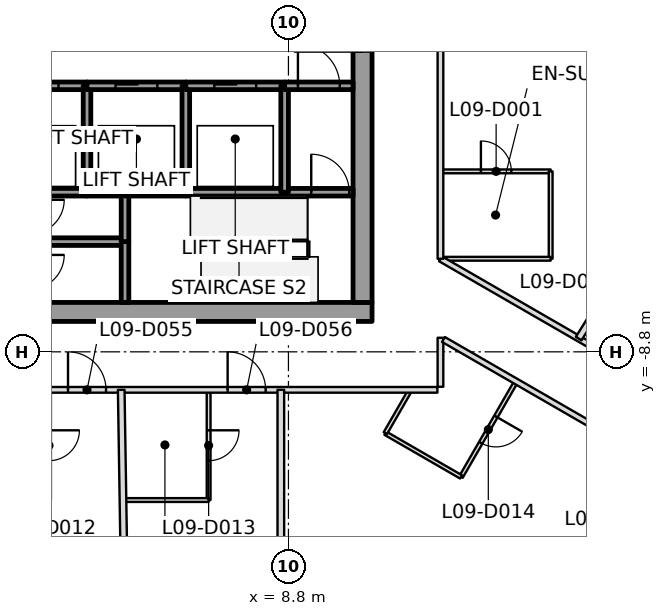
"""IFC4 building model, lengths in metres.
Left out: names, types, materials, properties, quantities, classifications, styles, units other than length and angle.
Written with IfcOpenShell. Run it as: python <this file> out.ifc"""

import sys

from ifc_helpers import new_model, si_unit, direction, frame, frame_2d, origin, place, context, subcontext, project, spatial, rectangle, extrude, element, fill, save


model = new_model("IFC4")
c1 = context("Model", 3, precision=1e-05, world=origin(), true_north=direction((0.0, 1.0)))
c2 = subcontext(c1, "Body", "Model", "MODEL_VIEW")
j1 = project(units=[si_unit("LENGTHUNIT", "METRE"), si_unit("PLANEANGLEUNIT", "RADIAN")], contexts=[c1])
p1 = place(None, origin())
s1 = spatial("IfcSite", under=j1, at=p1, CompositionType="ELEMENT")
p2 = place(p1, origin())
s2 = spatial("IfcBuilding", under=s1, at=p2, CompositionType="ELEMENT")
p3 = place(p2, frame((0.0, 0.0, 55.4)))
s3 = spatial("IfcBuildingStorey", under=s2, at=p3, CompositionType="ELEMENT", Elevation=55.4)
p4 = place(p3, frame((-11.0, -7.75, 0.0), z_axis=(0.0, 0.0, 1.0), x_axis=(1.0, 0.0, 0.0)))
e1 = element("IfcWall", 1, at=p4, inside=s3, PredefinedType="SHEAR", context=c2, shape_type="SweptSolid", body=[
    extrude(rectangle(XDim=22.0, YDim=0.5, at=frame_2d((11.0, 0.0))), origin(), (0.0, 0.0, 1.0), 3.7),
])
p5 = place(p4, frame((10.45, 0.0, 0.0)))
e2 = element("IfcOpeningElement", 2, at=p5, cuts=e1, PredefinedType="OPENING", context=c2, shape_type="SweptSolid", body=[
    extrude(rectangle(XDim=1.1, YDim=2.1, at=frame_2d((0.55, 1.05))), frame((0.0, 0.25, 0.0), z_axis=(0.0, -1.0, 0.0), x_axis=(1.0, 0.0, 0.0)), (0.0, 0.0, 1.0), 0.5),
])
p6 = place(p3, frame((10.75, -7.5, 0.0), z_axis=(0.0, 0.0, 1.0), x_axis=(0.0, 1.0, 0.0)))
e3 = element("IfcWall", 3, at=p6, inside=s3, PredefinedType="SHEAR", context=c2, shape_type="SweptSolid", body=[
    extrude(rectangle(XDim=15.0, YDim=0.5, at=frame_2d((7.5, 0.0))), origin(), (0.0, 0.0, 1.0), 3.7),
])
p7 = place(p6, frame((6.6, 0.0, 0.0)))
e4 = element("IfcOpeningElement", 4, at=p7, cuts=e3, PredefinedType="OPENING", context=c2, shape_type="SweptSolid", body=[
    extrude(rectangle(XDim=1.8, YDim=2.1, at=frame_2d((0.9, 1.05))), frame((0.0, 0.25, 0.0), z_axis=(0.0, -1.0, 0.0), x_axis=(1.0, 0.0, 0.0)), (0.0, 0.0, 1.0), 0.5),
])
p8 = place(p3, frame((0.9, -1.8, 0.0), z_axis=(0.0, 0.0, 1.0), x_axis=(1.0, 0.0, 0.0)))
e5 = element("IfcWall", 5, at=p8, inside=s3, PredefinedType="SOLIDWALL", context=c2, shape_type="SweptSolid", body=[
    extrude(rectangle(XDim=2.6, YDim=0.2, at=frame_2d((1.3, 0.0))), origin(), (0.0, 0.0, 1.0), 3.55),
])
p9 = place(p8, frame((0.75, 0.0, 0.0)))
e6 = element("IfcOpeningElement", 6, at=p9, cuts=e5, PredefinedType="OPENING", context=c2, shape_type="SweptSolid", body=[
    extrude(rectangle(XDim=1.1, YDim=2.1, at=frame_2d((0.55, 1.05))), frame((0.0, 0.1, 0.0), z_axis=(0.0, -1.0, 0.0), x_axis=(1.0, 0.0, 0.0)), (0.0, 0.0, 1.0), 0.2),
])
p10 = place(p3, frame((4.5, -5.9, 0.0), z_axis=(0.0, 0.0, 1.0), x_axis=(-1.0, 0.0, 0.0)))
e7 = element("IfcWall", 7, at=p10, inside=s3, PredefinedType="SOLIDWALL", context=c2, shape_type="SweptSolid", body=[
    extrude(rectangle(XDim=2.5, YDim=0.2, at=frame_2d((1.25, 0.0))), origin(), (0.0, 0.0, 1.0), 3.55),
])
p11 = place(p3, frame((3.5, -4.6, 0.0), z_axis=(0.0, 0.0, 1.0), x_axis=(-1.0, 0.0, 0.0)))
e8 = element("IfcWall", 8, at=p11, inside=s3, PredefinedType="SOLIDWALL", context=c2, shape_type="SweptSolid", body=[
    extrude(rectangle(XDim=1.5, YDim=0.2, at=frame_2d((0.75, 0.0))), origin(), (0.0, 0.0, 1.0), 3.55),
])
p12 = place(p3, frame((4.5, -4.6, 0.0), z_axis=(0.0, 0.0, 1.0), x_axis=(-1.0, 0.0, 0.0)))
e9 = element("IfcWall", 9, at=p12, inside=s3, PredefinedType="SOLIDWALL", context=c2, shape_type="SweptSolid", body=[
    extrude(rectangle(XDim=1.0, YDim=0.2, at=frame_2d((0.5, 0.0))), origin(), (0.0, 0.0, 1.0), 3.55),
])
p13 = place(p3, frame((3.5, -4.6, 0.0), z_axis=(0.0, 0.0, 1.0), x_axis=(0.0, 1.0, 0.0)))
e10 = element("IfcWall", 10, at=p13, inside=s3, PredefinedType="SOLIDWALL", context=c2, shape_type="SweptSolid", body=[
    extrude(rectangle(XDim=2.8, YDim=0.2, at=frame_2d((1.4, 0.0))), origin(), (0.0, 0.0, 1.0), 3.55),
])
p14 = place(p3, frame((3.5, -1.8, 0.0), z_axis=(0.0, 0.0, 1.0), x_axis=(1.0, 0.0, 0.0)))
e11 = element("IfcWall", 11, at=p14, inside=s3, PredefinedType="SOLIDWALL", context=c2, shape_type="SweptSolid", body=[
    extrude(rectangle(XDim=2.6, YDim=0.2, at=frame_2d((1.3, 0.0))), origin(), (0.0, 0.0, 1.0), 3.55),
])
p15 = place(p14, frame((0.75, 0.0, 0.0)))
e12 = element("IfcOpeningElement", 12, at=p15, cuts=e11, PredefinedType="OPENING", context=c2, shape_type="SweptSolid", body=[
    extrude(rectangle(XDim=1.1, YDim=2.1, at=frame_2d((0.55, 1.05))), frame((0.0, 0.1, 0.0), z_axis=(0.0, -1.0, 0.0), x_axis=(1.0, 0.0, 0.0)), (0.0, 0.0, 1.0), 0.2),
])
p16 = place(p3, frame((4.5, -7.5, 0.0), z_axis=(0.0, 0.0, 1.0), x_axis=(0.0, 1.0, 0.0)))
e13 = element("IfcWall", 13, at=p16, inside=s3, PredefinedType="SOLIDWALL", context=c2, shape_type="SweptSolid", body=[
    extrude(rectangle(XDim=1.6, YDim=0.2, at=frame_2d((0.8, 0.0))), origin(), (0.0, 0.0, 1.0), 3.55),
])
p17 = place(p3, frame((4.5, -5.9, 0.0), z_axis=(0.0, 0.0, 1.0), x_axis=(0.0, 1.0, 0.0)))
e14 = element("IfcWall", 14, at=p17, inside=s3, PredefinedType="SOLIDWALL", context=c2, shape_type="SweptSolid", body=[
    extrude(rectangle(XDim=1.3, YDim=0.2, at=frame_2d((0.65, 0.0))), origin(), (0.0, 0.0, 1.0), 3.55),
])
p18 = place(p3, frame((4.5, -4.6, 0.0), z_axis=(0.0, 0.0, 1.0), x_axis=(1.0, 0.0, 0.0)))
e15 = element("IfcWall", 15, at=p18, inside=s3, PredefinedType="SOLIDWALL", context=c2, shape_type="SweptSolid", body=[
    extrude(rectangle(XDim=1.6, YDim=0.2, at=frame_2d((0.8, 0.0))), origin(), (0.0, 0.0, 1.0), 3.55),
])
p19 = place(p3, frame((6.1, -4.6, 0.0), z_axis=(0.0, 0.0, 1.0), x_axis=(1.0, 0.0, 0.0)))
e16 = element("IfcWall", 16, at=p19, inside=s3, PredefinedType="SOLIDWALL", context=c2, shape_type="SweptSolid", body=[
    extrude(rectangle(XDim=2.6, YDim=0.2, at=frame_2d((1.3, 0.0))), origin(), (0.0, 0.0, 1.0), 3.55),
])
p20 = place(p3, frame((6.1, -4.6, 0.0), z_axis=(0.0, 0.0, 1.0), x_axis=(0.0, 1.0, 0.0)))
e17 = element("IfcWall", 17, at=p20, inside=s3, PredefinedType="SOLIDWALL", context=c2, shape_type="SweptSolid", body=[
    extrude(rectangle(XDim=2.8, YDim=0.2, at=frame_2d((1.4, 0.0))), origin(), (0.0, 0.0, 1.0), 3.55),
])
p21 = place(p3, frame((6.1, -1.8, 0.0), z_axis=(0.0, 0.0, 1.0), x_axis=(1.0, 0.0, 0.0)))
e18 = element("IfcWall", 18, at=p21, inside=s3, PredefinedType="SOLIDWALL", context=c2, shape_type="SweptSolid", body=[
    extrude(rectangle(XDim=2.6, YDim=0.2, at=frame_2d((1.3, 0.0))), origin(), (0.0, 0.0, 1.0), 3.55),
])
p22 = place(p21, frame((0.75, 0.0, 0.0)))
e19 = element("IfcOpeningElement", 19, at=p22, cuts=e18, PredefinedType="OPENING", context=c2, shape_type="SweptSolid", body=[
    extrude(rectangle(XDim=1.1, YDim=2.1, at=frame_2d((0.55, 1.05))), frame((0.0, 0.1, 0.0), z_axis=(0.0, -1.0, 0.0), x_axis=(1.0, 0.0, 0.0)), (0.0, 0.0, 1.0), 0.2),
])
p23 = place(p3, frame((8.7, -4.6, 0.0), z_axis=(0.0, 0.0, 1.0), x_axis=(1.0, 0.0, 0.0)))
e20 = element("IfcWall", 20, at=p23, inside=s3, PredefinedType="SOLIDWALL", context=c2, shape_type="SweptSolid", body=[
    extrude(rectangle(XDim=1.8, YDim=0.2, at=frame_2d((0.9, 0.0))), origin(), (0.0, 0.0, 1.0), 3.55),
])
p24 = place(p23, frame((0.7, 0.0, 0.0)))
e21 = element("IfcOpeningElement", 21, at=p24, cuts=e20, PredefinedType="OPENING", context=c2, shape_type="SweptSolid", body=[
    extrude(rectangle(XDim=1.0, YDim=2.1, at=frame_2d((0.5, 1.05))), frame((0.0, 0.1, 0.0), z_axis=(0.0, -1.0, 0.0), x_axis=(1.0, 0.0, 0.0)), (0.0, 0.0, 1.0), 0.2),
])
p25 = place(p3, frame((8.7, -1.8, 0.0), z_axis=(0.0, 0.0, 1.0), x_axis=(0.0, -1.0, 0.0)))
e22 = element("IfcWall", 22, at=p25, inside=s3, PredefinedType="SOLIDWALL", context=c2, shape_type="SweptSolid", body=[
    extrude(rectangle(XDim=2.8, YDim=0.2, at=frame_2d((1.4, 0.0))), origin(), (0.0, 0.0, 1.0), 3.55),
])
p26 = place(p3, frame((8.7, -1.8, 0.0), z_axis=(0.0, 0.0, 1.0), x_axis=(1.0, 0.0, 0.0)))
e23 = element("IfcWall", 23, at=p26, inside=s3, PredefinedType="SOLIDWALL", context=c2, shape_type="SweptSolid", body=[
    extrude(rectangle(XDim=1.8, YDim=0.2, at=frame_2d((0.9, 0.0))), origin(), (0.0, 0.0, 1.0), 3.55),
])
p27 = place(p26, frame((0.35, 0.0, 0.0)))
e24 = element("IfcOpeningElement", 24, at=p27, cuts=e23, PredefinedType="OPENING", context=c2, shape_type="SweptSolid", body=[
    extrude(rectangle(XDim=1.1, YDim=2.1, at=frame_2d((0.55, 1.05))), frame((0.0, 0.1, 0.0), z_axis=(0.0, -1.0, 0.0), x_axis=(1.0, 0.0, 0.0)), (0.0, 0.0, 1.0), 0.2),
])
p28 = place(p3, frame((4.4, -9.8, 0.0), z_axis=(0.0, 0.0, 1.0), x_axis=(0.015892742746, -0.999873702388, 0.0)))
e25 = element("IfcWall", 25, at=p28, inside=s3, PredefinedType="PARTITIONING", context=c2, shape_type="SweptSolid", body=[
    extrude(rectangle(XDim=17.297, YDim=0.175, at=frame_2d((8.649, 0.0))), origin(), (0.0, 0.0, 1.0), 2.934),
])
p29 = place(p3, frame((8.6, -9.8, 0.0), z_axis=(0.0, 0.0, 1.0), x_axis=(0.0, -1.0, 0.0)))
e26 = element("IfcWall", 26, at=p29, inside=s3, PredefinedType="PARTITIONING", context=c2, shape_type="SweptSolid", body=[
    extrude(rectangle(XDim=17.31, YDim=0.175, at=frame_2d((8.655, 0.0))), origin(), (0.0, 0.0, 1.0), 2.934),
])
p30 = place(p3, frame((19.724, -12.427, 0.0), z_axis=(0.0, 0.0, 1.0), x_axis=(-0.499994112739, -0.866028802769, 0.0)))
e27 = element("IfcWall", 27, at=p30, inside=s3, PredefinedType="PARTITIONING", context=c2, shape_type="SweptSolid", body=[
    extrude(rectangle(XDim=13.847, YDim=0.175, at=frame_2d((6.924, 0.0))), origin(), (0.0, 0.0, 1.0), 2.797),
])
p31 = place(p3, frame((24.065, 3.75, 0.0), z_axis=(0.0, 0.0, 1.0), x_axis=(-0.530143821716, -0.847907735721, 0.0)))
e28 = element("IfcWall", 28, at=p31, inside=s3, PredefinedType="PARTITIONING", context=c2, shape_type="SweptSolid", body=[
    extrude(rectangle(XDim=14.389, YDim=0.175, at=frame_2d((7.194, 0.0))), origin(), (0.0, 0.0, 1.0), 2.947),
])
p32 = place(p3, frame((-12.72, -9.8, 0.0), z_axis=(0.0, 0.0, 1.0), x_axis=(1.0, 0.0, 0.0)))
e29 = element("IfcWall", 29, at=p32, inside=s3, PredefinedType="PARTITIONING", context=c2, shape_type="SweptSolid", body=[
    extrude(rectangle(XDim=25.44, YDim=0.15, at=frame_2d((12.72, 0.0))), origin(), (0.0, 0.0, 1.0), 2.797),
])
p33 = place(p32, frame((7.32, 0.0, 0.0)))
e30 = element("IfcOpeningElement", 30, at=p33, cuts=e29, PredefinedType="OPENING", context=c2, shape_type="SweptSolid", body=[
    extrude(rectangle(XDim=1.0, YDim=2.1, at=frame_2d((0.5, 1.05))), frame((0.0, 0.075, 0.0), z_axis=(0.0, -1.0, 0.0), x_axis=(1.0, 0.0, 0.0)), (0.0, 0.0, 1.0), 0.15),
])
p34 = place(p32, frame((11.52, 0.0, 0.0)))
e31 = element("IfcOpeningElement", 31, at=p34, cuts=e29, PredefinedType="OPENING", context=c2, shape_type="SweptSolid", body=[
    extrude(rectangle(XDim=1.0, YDim=2.1, at=frame_2d((0.5, 1.05))), frame((0.0, 0.075, 0.0), z_axis=(0.0, -1.0, 0.0), x_axis=(1.0, 0.0, 0.0)), (0.0, 0.0, 1.0), 0.15),
])
p35 = place(p32, frame((15.72, 0.0, 0.0)))
e32 = element("IfcOpeningElement", 32, at=p35, cuts=e29, PredefinedType="OPENING", context=c2, shape_type="SweptSolid", body=[
    extrude(rectangle(XDim=1.0, YDim=2.1, at=frame_2d((0.5, 1.05))), frame((0.0, 0.075, 0.0), z_axis=(0.0, -1.0, 0.0), x_axis=(1.0, 0.0, 0.0)), (0.0, 0.0, 1.0), 0.15),
])
p36 = place(p32, frame((19.92, 0.0, 0.0)))
e33 = element("IfcOpeningElement", 33, at=p36, cuts=e29, PredefinedType="OPENING", context=c2, shape_type="SweptSolid", body=[
    extrude(rectangle(XDim=1.0, YDim=2.1, at=frame_2d((0.5, 1.05))), frame((0.0, 0.075, 0.0), z_axis=(0.0, -1.0, 0.0), x_axis=(1.0, 0.0, 0.0)), (0.0, 0.0, 1.0), 0.15),
])
p37 = place(p3, frame((12.8, -9.72, 0.0), z_axis=(0.0, 0.0, 1.0), x_axis=(0.0, 1.0, 0.0)))
e34 = element("IfcWall", 34, at=p37, inside=s3, PredefinedType="PARTITIONING", context=c2, shape_type="SweptSolid", body=[
    extrude(rectangle(XDim=1.291, YDim=0.15, at=frame_2d((0.646, 0.0))), origin(), (0.0, 0.0, 1.0), 2.797),
])
p38 = place(p3, frame((12.879, -8.475, 0.0), z_axis=(0.0, 0.0, 1.0), x_axis=(0.866028715104, -0.499994264582, 0.0)))
e35 = element("IfcWall", 35, at=p38, inside=s3, PredefinedType="PARTITIONING", context=c2, shape_type="SweptSolid", body=[
    extrude(rectangle(XDim=12.103, YDim=0.15, at=frame_2d((6.052, 0.0))), origin(), (0.0, 0.0, 1.0), 2.797),
])
p39 = place(p38, frame((4.606, 0.0, 0.0)))
e36 = element("IfcOpeningElement", 36, at=p39, cuts=e35, PredefinedType="OPENING", context=c2, shape_type="SweptSolid", body=[
    extrude(rectangle(XDim=1.0, YDim=2.1, at=frame_2d((0.5, 1.05))), frame((0.0, 0.075, 0.0), z_axis=(0.0, -1.0, 0.0), x_axis=(1.0, 0.0, 0.0)), (0.0, 0.0, 1.0), 0.15),
])
p40 = place(p38, frame((10.703, 0.0, 0.0)))
e37 = element("IfcOpeningElement", 37, at=p40, cuts=e35, PredefinedType="OPENING", context=c2, shape_type="SweptSolid", body=[
    extrude(rectangle(XDim=1.0, YDim=2.1, at=frame_2d((0.5, 1.05))), frame((0.0, 0.075, 0.0), z_axis=(0.0, -1.0, 0.0), x_axis=(1.0, 0.0, 0.0)), (0.0, 0.0, 1.0), 0.15),
])
p41 = place(p3, frame((24.192, -12.928, 0.0), z_axis=(0.0, 0.0, 1.0), x_axis=(-0.866018681408, 0.500011643316, 0.0)))
e38 = element("IfcWall", 38, at=p41, inside=s3, PredefinedType="PARTITIONING", context=c2, shape_type="SweptSolid", body=[
    extrude(rectangle(XDim=13.154, YDim=0.15, at=frame_2d((6.577, 0.0))), origin(), (0.0, 0.0, 1.0), 2.947),
])
p42 = place(p41, frame((3.037, 0.0, 0.0)))
e39 = element("IfcOpeningElement", 39, at=p42, cuts=e38, PredefinedType="OPENING", context=c2, shape_type="SweptSolid", body=[
    extrude(rectangle(XDim=1.0, YDim=2.1, at=frame_2d((0.5, 1.05))), frame((0.0, 0.075, 0.0), z_axis=(0.0, -1.0, 0.0), x_axis=(1.0, 0.0, 0.0)), (0.0, 0.0, 1.0), 0.15),
])
p43 = place(p41, frame((7.554, 0.0, 0.0)))
e40 = element("IfcOpeningElement", 40, at=p43, cuts=e38, PredefinedType="OPENING", context=c2, shape_type="SweptSolid", body=[
    extrude(rectangle(XDim=1.0, YDim=2.1, at=frame_2d((0.5, 1.05))), frame((0.0, 0.075, 0.0), z_axis=(0.0, -1.0, 0.0), x_axis=(1.0, 0.0, 0.0)), (0.0, 0.0, 1.0), 0.15),
])
p44 = place(p3, frame((12.8, -6.351, 0.0), z_axis=(0.0, 0.0, 1.0), x_axis=(0.0, 1.0, 0.0)))
e41 = element("IfcWall", 41, at=p44, inside=s3, PredefinedType="PARTITIONING", context=c2, shape_type="SweptSolid", body=[
    extrude(rectangle(XDim=16.071, YDim=0.15, at=frame_2d((8.035, 0.0))), origin(), (0.0, 0.0, 1.0), 3.0),
])
p45 = place(p44, frame((6.676, 0.0, 0.0)))
e42 = element("IfcOpeningElement", 42, at=p45, cuts=e41, PredefinedType="OPENING", context=c2, shape_type="SweptSolid", body=[
    extrude(rectangle(XDim=1.0, YDim=2.1, at=frame_2d((0.5, 1.05))), frame((0.0, 0.075, 0.0), z_axis=(0.0, -1.0, 0.0), x_axis=(1.0, 0.0, 0.0)), (0.0, 0.0, 1.0), 0.15),
])
p46 = place(p44, frame((14.751, 0.0, 0.0)))
e43 = element("IfcOpeningElement", 43, at=p46, cuts=e41, PredefinedType="OPENING", context=c2, shape_type="SweptSolid", body=[
    extrude(rectangle(XDim=1.0, YDim=2.1, at=frame_2d((0.5, 1.05))), frame((0.0, 0.075, 0.0), z_axis=(0.0, -1.0, 0.0), x_axis=(1.0, 0.0, 0.0)), (0.0, 0.0, 1.0), 0.15),
])
p47 = place(p3, frame((6.7, -9.83, 0.0), z_axis=(0.0, 0.0, 1.0), x_axis=(0.0, -1.0, 0.0)))
e44 = element("IfcWall", 44, at=p47, inside=s3, PredefinedType="PARTITIONING", context=c2, shape_type="SweptSolid", body=[
    extrude(rectangle(XDim=2.87, YDim=0.1, at=frame_2d((1.435, 0.0))), origin(), (0.0, 0.0, 1.0), 3.0),
])
p48 = place(p47, frame((1.035, 0.0, 0.0)))
e45 = element("IfcOpeningElement", 45, at=p48, cuts=e44, PredefinedType="OPENING", context=c2, shape_type="SweptSolid", body=[
    extrude(rectangle(XDim=0.8, YDim=2.1, at=frame_2d((0.4, 1.05))), frame((0.0, 0.05, 0.0), z_axis=(0.0, -1.0, 0.0), x_axis=(1.0, 0.0, 0.0)), (0.0, 0.0, 1.0), 0.1),
])
p49 = place(p3, frame((6.7, -12.7, 0.0), z_axis=(0.0, 0.0, 1.0), x_axis=(-1.0, 0.0, 0.0)))
e46 = element("IfcWall", 46, at=p49, inside=s3, PredefinedType="PARTITIONING", context=c2, shape_type="SweptSolid", body=[
    extrude(rectangle(XDim=2.27, YDim=0.1, at=frame_2d((1.135, 0.0))), origin(), (0.0, 0.0, 1.0), 2.947),
])
p50 = place(p3, frame((14.777, -9.605, 0.0), z_axis=(0.0, 0.0, 1.0), x_axis=(-0.499999802827, -0.866025517622, 0.0)))
e47 = element("IfcWall", 47, at=p50, inside=s3, PredefinedType="PARTITIONING", context=c2, shape_type="SweptSolid", body=[
    extrude(rectangle(XDim=2.87, YDim=0.1, at=frame_2d((1.435, 0.0))), origin(), (0.0, 0.0, 1.0), 2.797),
])
p51 = place(p50, frame((1.035, 0.0, 0.0)))
e48 = element("IfcOpeningElement", 48, at=p51, cuts=e47, PredefinedType="OPENING", context=c2, shape_type="SweptSolid", body=[
    extrude(rectangle(XDim=0.8, YDim=2.1, at=frame_2d((0.4, 1.05))), frame((0.0, 0.05, 0.0), z_axis=(0.0, -1.0, 0.0), x_axis=(1.0, 0.0, 0.0)), (0.0, 0.0, 1.0), 0.1),
])
p52 = place(p3, frame((13.342, -12.091, 0.0), z_axis=(0.0, 0.0, 1.0), x_axis=(-0.86602648383, 0.499998129301, 0.0)))
e49 = element("IfcWall", 49, at=p52, inside=s3, PredefinedType="PARTITIONING", context=c2, shape_type="SweptSolid", body=[
    extrude(rectangle(XDim=2.3, YDim=0.1, at=frame_2d((1.15, 0.0))), origin(), (0.0, 0.0, 1.0), 2.947),
])
p53 = place(p3, frame((11.35, -10.941, 0.0), z_axis=(0.0, 0.0, 1.0), x_axis=(0.499865263774, 0.866103179807, 0.0)))
e50 = element("IfcWall", 50, at=p53, inside=s3, PredefinedType="PARTITIONING", context=c2, shape_type="SweptSolid", body=[
    extrude(rectangle(XDim=1.282, YDim=0.1, at=frame_2d((0.641, 0.0))), origin(), (0.0, 0.0, 1.0), 3.0),
])
p54 = place(p3, frame((12.83, -4.051, 0.0), z_axis=(0.0, 0.0, 1.0), x_axis=(1.0, 0.0, 0.0)))
e51 = element("IfcWall", 51, at=p54, inside=s3, PredefinedType="PARTITIONING", context=c2, shape_type="SweptSolid", body=[
    extrude(rectangle(XDim=2.87, YDim=0.1, at=frame_2d((1.435, 0.0))), origin(), (0.0, 0.0, 1.0), 3.0),
])
p55 = place(p54, frame((1.035, 0.0, 0.0)))
e52 = element("IfcOpeningElement", 52, at=p55, cuts=e51, PredefinedType="OPENING", context=c2, shape_type="SweptSolid", body=[
    extrude(rectangle(XDim=0.8, YDim=2.1, at=frame_2d((0.4, 1.05))), frame((0.0, 0.05, 0.0), z_axis=(0.0, -1.0, 0.0), x_axis=(1.0, 0.0, 0.0)), (0.0, 0.0, 1.0), 0.1),
])
p56 = place(p3, frame((15.7, -4.051, 0.0), z_axis=(0.0, 0.0, 1.0), x_axis=(0.0, -1.0, 0.0)))
e53 = element("IfcWall", 53, at=p56, inside=s3, PredefinedType="PARTITIONING", context=c2, shape_type="SweptSolid", body=[
    extrude(rectangle(XDim=2.3, YDim=0.1, at=frame_2d((1.15, 0.0))), origin(), (0.0, 0.0, 1.0), 2.947),
])
p57 = place(p3, frame((15.7, -6.351, 0.0), z_axis=(0.0, 0.0, 1.0), x_axis=(-1.0, 0.0, 0.0)))
e54 = element("IfcWall", 54, at=p57, inside=s3, PredefinedType="PARTITIONING", context=c2, shape_type="SweptSolid", body=[
    extrude(rectangle(XDim=2.84, YDim=0.1, at=frame_2d((1.42, 0.0))), origin(), (0.0, 0.0, 1.0), 2.947),
])
p58 = place(p55, origin())
e55 = element("IfcDoor", 55, at=p58, inside=s3, OperationType="SINGLE_SWING_LEFT", PredefinedType="DOOR", context=c2, shape_type="SweptSolid", body=[
    extrude(rectangle(XDim=0.8, YDim=2.1, at=frame_2d((0.4, 1.05))), frame((0.0, 0.025, 0.0), z_axis=(0.0, -1.0, 0.0), x_axis=(1.0, 0.0, 0.0)), (0.0, 0.0, 1.0), 0.05),
])
fill(e52, e55)
p59 = place(p35, origin())
e56 = element("IfcDoor", 56, at=p59, inside=s3, OperationType="SINGLE_SWING_LEFT", PredefinedType="DOOR", context=c2, shape_type="SweptSolid", body=[
    extrude(rectangle(XDim=1.0, YDim=2.1, at=frame_2d((0.5, 1.05))), frame((0.0, 0.025, 0.0), z_axis=(0.0, -1.0, 0.0), x_axis=(1.0, 0.0, 0.0)), (0.0, 0.0, 1.0), 0.05),
])
fill(e32, e56)
p60 = place(p36, origin())
e57 = element("IfcDoor", 57, at=p60, inside=s3, OperationType="SINGLE_SWING_LEFT", PredefinedType="DOOR", context=c2, shape_type="SweptSolid", body=[
    extrude(rectangle(XDim=1.0, YDim=2.1, at=frame_2d((0.5, 1.05))), frame((0.0, 0.025, 0.0), z_axis=(0.0, -1.0, 0.0), x_axis=(1.0, 0.0, 0.0)), (0.0, 0.0, 1.0), 0.05),
])
fill(e33, e57)
p61 = place(p48, origin())
e58 = element("IfcDoor", 58, at=p61, inside=s3, OperationType="SINGLE_SWING_RIGHT", PredefinedType="DOOR", context=c2, shape_type="SweptSolid", body=[
    extrude(rectangle(XDim=0.8, YDim=2.1, at=frame_2d((0.4, 1.05))), frame((0.0, 0.025, 0.0), z_axis=(0.0, -1.0, 0.0), x_axis=(1.0, 0.0, 0.0)), (0.0, 0.0, 1.0), 0.05),
])
fill(e45, e58)
p62 = place(p51, origin())
e59 = element("IfcDoor", 59, at=p62, inside=s3, OperationType="SINGLE_SWING_RIGHT", PredefinedType="DOOR", context=c2, shape_type="SweptSolid", body=[
    extrude(rectangle(XDim=0.8, YDim=2.1, at=frame_2d((0.4, 1.05))), frame((0.0, 0.025, 0.0), z_axis=(0.0, -1.0, 0.0), x_axis=(1.0, 0.0, 0.0)), (0.0, 0.0, 1.0), 0.05),
])
fill(e48, e59)
p63 = place(p9, origin())
e60 = element("IfcDoor", 60, at=p63, inside=s3, OperationType="SLIDING_TO_RIGHT", PredefinedType="DOOR", context=c2, shape_type="SweptSolid", body=[
    extrude(rectangle(XDim=1.1, YDim=2.1, at=frame_2d((0.55, 1.05))), frame((0.0, 0.025, 0.0), z_axis=(0.0, -1.0, 0.0), x_axis=(1.0, 0.0, 0.0)), (0.0, 0.0, 1.0), 0.05),
])
fill(e6, e60)
p64 = place(p15, origin())
e61 = element("IfcDoor", 61, at=p64, inside=s3, OperationType="SLIDING_TO_RIGHT", PredefinedType="DOOR", context=c2, shape_type="SweptSolid", body=[
    extrude(rectangle(XDim=1.1, YDim=2.1, at=frame_2d((0.55, 1.05))), frame((0.0, 0.025, 0.0), z_axis=(0.0, -1.0, 0.0), x_axis=(1.0, 0.0, 0.0)), (0.0, 0.0, 1.0), 0.05),
])
fill(e12, e61)
p65 = place(p22, origin())
e62 = element("IfcDoor", 62, at=p65, inside=s3, OperationType="SLIDING_TO_LEFT", PredefinedType="DOOR", context=c2, shape_type="SweptSolid", body=[
    extrude(rectangle(XDim=1.1, YDim=2.1, at=frame_2d((0.55, 1.05))), frame((0.0, 0.025, 0.0), z_axis=(0.0, -1.0, 0.0), x_axis=(1.0, 0.0, 0.0)), (0.0, 0.0, 1.0), 0.05),
])
fill(e19, e62)
p66 = place(p27, origin())
e63 = element("IfcDoor", 63, at=p66, inside=s3, OperationType="SINGLE_SWING_LEFT", PredefinedType="DOOR", context=c2, shape_type="SweptSolid", body=[
    extrude(rectangle(XDim=1.1, YDim=2.1, at=frame_2d((0.55, 1.05))), frame((0.0, 0.025, 0.0), z_axis=(0.0, -1.0, 0.0), x_axis=(1.0, 0.0, 0.0)), (0.0, 0.0, 1.0), 0.05),
])
fill(e24, e63)
p67 = place(p24, origin())
e64 = element("IfcDoor", 64, at=p67, inside=s3, OperationType="SINGLE_SWING_RIGHT", PredefinedType="DOOR", context=c2, shape_type="SweptSolid", body=[
    extrude(rectangle(XDim=1.0, YDim=2.1, at=frame_2d((0.5, 1.05))), frame((0.0, 0.025, 0.0), z_axis=(0.0, -1.0, 0.0), x_axis=(1.0, 0.0, 0.0)), (0.0, 0.0, 1.0), 0.05),
])
fill(e21, e64)
p68 = place(p7, origin())
e65 = element("IfcDoor", 65, at=p68, inside=s3, OperationType="DOUBLE_DOOR_SINGLE_SWING", PredefinedType="DOOR", context=c2, shape_type="SweptSolid", body=[
    extrude(rectangle(XDim=1.8, YDim=2.1, at=frame_2d((0.9, 1.05))), frame((0.0, 0.025, 0.0), z_axis=(0.0, -1.0, 0.0), x_axis=(1.0, 0.0, 0.0)), (0.0, 0.0, 1.0), 0.05),
])
fill(e4, e65)
save(model, sys.argv[1])
